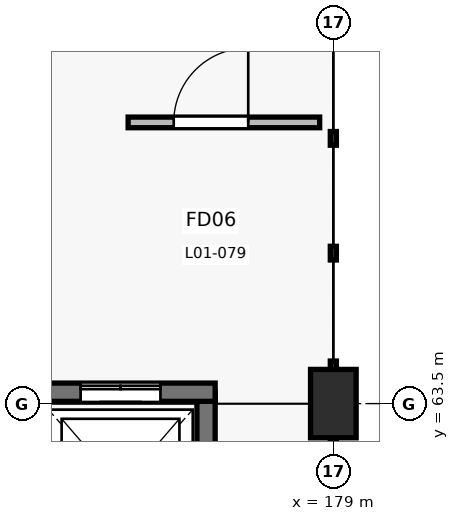
"""IFC4 building model, lengths in metres.
Left out: names, types, materials, properties, quantities, classifications, styles, units other than length and angle.
Written with IfcOpenShell. Run it as: python <this file> out.ifc"""

import sys

from ifc_helpers import new_model, si_unit, direction, frame, frame_2d, origin, origin_2d, place, context, subcontext, project, spatial, rectangle, extrude, element, fill, save


model = new_model("IFC4")
c1 = context("Model", 3, precision=1e-05, world=origin(), true_north=direction((0.0, 1.0)))
c2 = subcontext(c1, "Body", "Model", "MODEL_VIEW")
j1 = project(units=[si_unit("LENGTHUNIT", "METRE"), si_unit("PLANEANGLEUNIT", "RADIAN")], contexts=[c1])
p1 = place(None, origin())
s1 = spatial("IfcSite", under=j1, at=p1, CompositionType="ELEMENT")
p2 = place(p1, origin())
s2 = spatial("IfcBuilding", under=s1, at=p2, CompositionType="ELEMENT")
p3 = place(p2, frame((0.0, 0.0, 4.8)))
s3 = spatial("IfcBuildingStorey", under=s2, at=p3, CompositionType="ELEMENT", Elevation=4.8)
p4 = place(p3, frame((179.0, 63.5, 0.0), z_axis=(0.0, 0.0, 1.0), x_axis=(1.0, 0.0, 0.0)))
e1 = element("IfcColumn", 1, at=p4, inside=s3, PredefinedType="COLUMN", context=c2, shape_type="SweptSolid", body=[
    extrude(rectangle(XDim=0.6, YDim=0.9, at=origin_2d()), origin(), (0.0, 0.0, 1.0), 4.2),
])
p5 = place(p3, frame((177.325, 63.65, 0.0), z_axis=(0.0, 0.0, 1.0), x_axis=(0.0, -1.0, 0.0)))
e2 = element("IfcWall", 2, at=p5, inside=s3, PredefinedType="SHEAR", context=c2, shape_type="SweptSolid", body=[
    extrude(rectangle(XDim=2.5, YDim=0.24, at=frame_2d((1.25, 0.0))), origin(), (0.0, 0.0, 1.0), 8.18),
])
p6 = place(p3, frame((174.955, 63.65, 0.0), z_axis=(0.0, 0.0, 1.0), x_axis=(1.0, 0.0, 0.0)))
e3 = element("IfcWall", 3, at=p6, inside=s3, PredefinedType="SHEAR", context=c2, shape_type="SweptSolid", body=[
    extrude(rectangle(XDim=2.49, YDim=0.24, at=frame_2d((1.245, 0.0))), origin(), (0.0, 0.0, 1.0), 8.18),
])
p7 = place(p6, frame((0.72, 0.0, 0.0)))
e4 = element("IfcOpeningElement", 4, at=p7, cuts=e3, PredefinedType="OPENING", context=c2, shape_type="SweptSolid", body=[
    extrude(rectangle(XDim=1.05, YDim=2.1, at=frame_2d((0.525, 1.05))), frame((0.0, 0.13, 0.0), z_axis=(0.0, -1.0, 0.0), x_axis=(1.0, 0.0, 0.0)), (0.0, 0.0, 1.0), 0.26),
])
p8 = place(p3, frame((176.3, 67.2, 0.0), z_axis=(0.0, 0.0, 1.0), x_axis=(1.0, 0.0, 0.0)))
e5 = element("IfcWall", 5, at=p8, inside=s3, PredefinedType="PARTITIONING", context=c2, shape_type="SweptSolid", body=[
    extrude(rectangle(XDim=2.52, YDim=0.14, at=frame_2d((1.26, 0.0))), origin(), (0.0, 0.0, 1.0), 8.17),
])
p9 = place(p8, frame((0.6, 0.0, 0.0)))
e6 = element("IfcOpeningElement", 6, at=p9, cuts=e5, PredefinedType="OPENING", context=c2, shape_type="SweptSolid", body=[
    extrude(rectangle(XDim=0.98, YDim=2.1, at=frame_2d((0.49, 1.05))), frame((0.0, 0.08, 0.0), z_axis=(0.0, -1.0, 0.0), x_axis=(1.0, 0.0, 0.0)), (0.0, 0.0, 1.0), 0.16),
])
p10 = place(p7, origin())
e7 = element("IfcDoor", 7, at=p10, inside=s3, OperationType="DOUBLE_DOOR_SLIDING", PredefinedType="USERDEFINED", context=c2, shape_type="SweptSolid", body=[
    extrude(rectangle(XDim=1.05, YDim=2.1, at=frame_2d((0.525, 1.05))), frame((0.0, 0.025, 0.0), z_axis=(0.0, -1.0, 0.0), x_axis=(1.0, 0.0, 0.0)), (0.0, 0.0, 1.0), 0.05),
])
fill(e4, e7)
p11 = place(p9, origin())
e8 = element("IfcDoor", 8, at=p11, inside=s3, OperationType="SINGLE_SWING_RIGHT", PredefinedType="DOOR", context=c2, shape_type="SweptSolid", body=[
    extrude(rectangle(XDim=0.98, YDim=2.1, at=frame_2d((0.49, 1.05))), frame((0.0, 0.025, 0.0), z_axis=(0.0, -1.0, 0.0), x_axis=(1.0, 0.0, 0.0)), (0.0, 0.0, 1.0), 0.05),
])
fill(e6, e8)
save(model, sys.argv[1])
